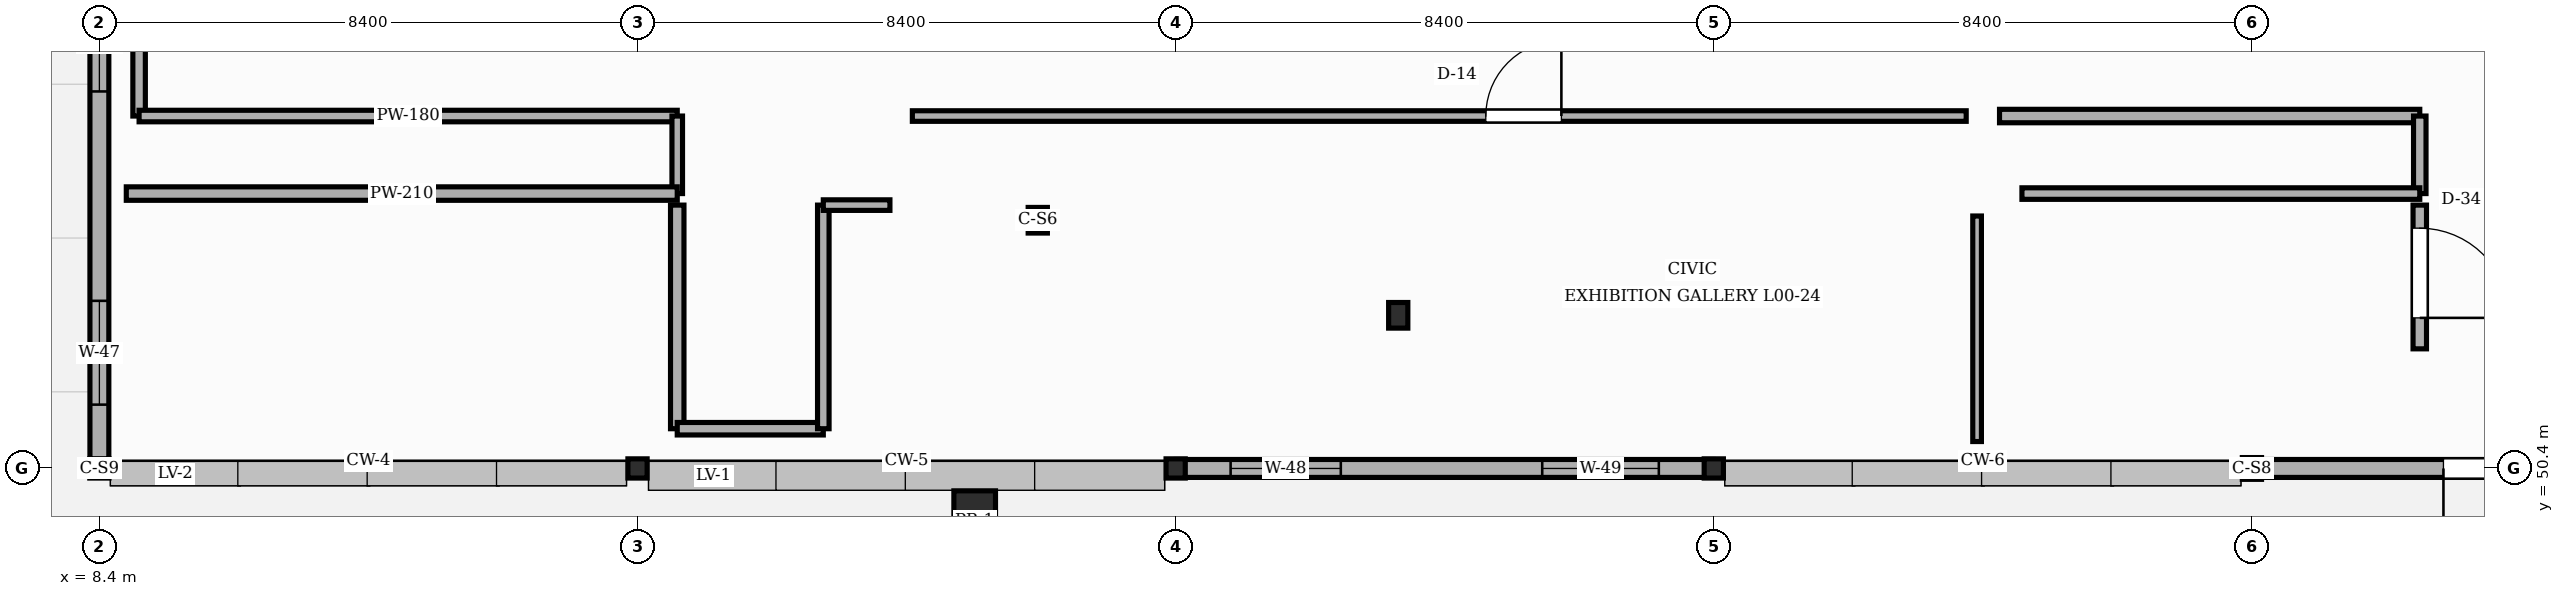
"""IFC4 building model, lengths in metres.
Left out: names, types, materials, properties, quantities, classifications, styles, units other than length and angle.
Written with IfcOpenShell. Run it as: python <this file> out.ifc"""

import sys

from ifc_helpers import new_model, si_unit, direction, frame, frame_2d, origin, origin_2d, place, context, subcontext, project, spatial, rectangle, i_section, extrude, element, fill, save


model = new_model("IFC4")
c1 = context("Model", 3, precision=1e-05, world=origin(), true_north=direction((0.0, 1.0)))
c2 = subcontext(c1, "Body", "Model", "MODEL_VIEW")
j1 = project(units=[si_unit("LENGTHUNIT", "METRE"), si_unit("PLANEANGLEUNIT", "RADIAN")], contexts=[c1])
p1 = place(None, origin())
s1 = spatial("IfcSite", under=j1, at=p1, CompositionType="ELEMENT")
p2 = place(p1, origin())
s2 = spatial("IfcBuilding", under=s1, at=p2, CompositionType="ELEMENT")
p3 = place(p2, origin())
s3 = spatial("IfcBuildingStorey", under=s2, at=p3, CompositionType="ELEMENT", Elevation=0.0)
for number, where, z_axis, x_axis in (
    (1, (8.4, 50.4, 0.0), (0.0, 0.0, 1.0), (1.0, 0.0, 0.0)),
    (2, (16.8, 50.4, 0.0), (0.0, 0.0, 1.0), (1.0, 0.0, 0.0)),
    (3, (25.2, 50.4, 0.0), (0.0, 0.0, 1.0), (1.0, 0.0, 0.0)),
    (4, (33.6, 50.4, 0.0), (0.0, 0.0, 1.0), (1.0, 0.0, 0.0)),
):
    element("IfcColumn", number, at=place(p3, frame(where, z_axis=z_axis, x_axis=x_axis)), inside=s3, PredefinedType="COLUMN", context=c2, shape_type="SweptSolid", body=[
        extrude(i_section(OverallWidth=0.3, OverallDepth=0.3, WebThickness=0.011, FlangeThickness=0.019, FilletRadius=0.027, at=origin_2d()), origin(), (0.0, 0.0, 1.0), 5.4),
    ])
p4 = place(p3, frame((42.0, 50.4, 0.0), z_axis=(0.0, 0.0, 1.0), x_axis=(1.0, 0.0, 0.0)))
e5 = element("IfcColumn", 5, at=p4, inside=s3, PredefinedType="COLUMN", context=c2, shape_type="SweptSolid", body=[
    extrude(i_section(OverallWidth=0.3, OverallDepth=0.34, WebThickness=0.012, FlangeThickness=0.021, FilletRadius=0.027, at=origin_2d()), origin(), (0.0, 0.0, 1.0), 5.4),
])
p5 = place(p3, frame((22.063, 49.576, 0.0), z_axis=(0.0, 0.0, 1.0), x_axis=(1.0, 0.0, 0.0)))
e6 = element("IfcColumn", 6, at=p5, inside=s3, PredefinedType="PILASTER", context=c2, shape_type="SweptSolid", body=[
    extrude(rectangle(XDim=0.65, YDim=0.95, at=origin_2d()), origin(), (0.0, 0.0, 1.0), 5.4),
])
for number, where, z_axis, x_axis in (
    (7, (23.048, 54.274, 0.0), (0.0, 0.0, 1.0), (1.0, 0.0, 0.0)),
    (8, (28.674, 52.79, 0.0), (0.0, 0.0, 1.0), (1.0, 0.0, 0.0)),
):
    element("IfcColumn", number, at=place(p3, frame(where, z_axis=z_axis, x_axis=x_axis)), inside=s3, PredefinedType="COLUMN", context=c2, shape_type="SweptSolid", body=[
        extrude(i_section(OverallWidth=0.3, OverallDepth=0.4, WebThickness=0.013, FlangeThickness=0.024, FilletRadius=0.027, at=origin_2d()), origin(), (0.0, 0.0, 1.0), 5.4),
    ])
p6 = place(p3, frame((8.4, 58.654, 0.0), z_axis=(0.0, 0.0, 1.0), x_axis=(0.0, -1.0, 0.0)))
e9 = element("IfcWall", 9, at=p6, inside=s3, PredefinedType="STANDARD", context=c2, shape_type="SweptSolid", body=[
    extrude(rectangle(XDim=8.108, YDim=0.295, at=frame_2d((4.054, 0.0))), origin(), (0.0, 0.0, 1.0), 4.887),
])
p7 = place(p6, frame((0.85, 0.0, 0.9)))
e10 = element("IfcOpeningElement", 10, at=p7, cuts=e9, PredefinedType="OPENING", context=c2, shape_type="SweptSolid", body=[
    extrude(rectangle(XDim=1.52, YDim=1.85, at=frame_2d((0.76, 0.925))), frame((0.0, 0.157, 0.0), z_axis=(0.0, -1.0, 0.0), x_axis=(1.0, 0.0, 0.0)), (0.0, 0.0, 1.0), 0.315),
])
p8 = place(p6, frame((5.638, 0.0, 0.9)))
e11 = element("IfcOpeningElement", 11, at=p8, cuts=e9, PredefinedType="OPENING", context=c2, shape_type="SweptSolid", body=[
    extrude(rectangle(XDim=1.62, YDim=1.85, at=frame_2d((0.81, 0.925))), frame((0.0, 0.157, 0.0), z_axis=(0.0, -1.0, 0.0), x_axis=(1.0, 0.0, 0.0)), (0.0, 0.0, 1.0), 0.315),
])
p9 = place(p3, frame((25.208, 50.4, 0.0), z_axis=(0.0, 0.0, 1.0), x_axis=(1.0, 0.0, 0.0)))
e12 = element("IfcWall", 12, at=p9, inside=s3, PredefinedType="STANDARD", context=c2, shape_type="SweptSolid", body=[
    extrude(rectangle(XDim=8.384, YDim=0.28, at=frame_2d((4.192, 0.0))), origin(), (0.0, 0.0, 1.0), 4.752),
])
p10 = place(p9, frame((0.85, 0.0, 0.9)))
e13 = element("IfcOpeningElement", 13, at=p10, cuts=e12, PredefinedType="OPENING", context=c2, shape_type="SweptSolid", body=[
    extrude(rectangle(XDim=1.72, YDim=1.85, at=frame_2d((0.86, 0.925))), frame((0.0, 0.15, 0.0), z_axis=(0.0, -1.0, 0.0), x_axis=(1.0, 0.0, 0.0)), (0.0, 0.0, 1.0), 0.3),
])
p11 = place(p9, frame((5.714, 0.0, 0.9)))
e14 = element("IfcOpeningElement", 14, at=p11, cuts=e12, PredefinedType="OPENING", context=c2, shape_type="SweptSolid", body=[
    extrude(rectangle(XDim=1.82, YDim=1.85, at=frame_2d((0.91, 0.925))), frame((0.0, 0.15, 0.0), z_axis=(0.0, -1.0, 0.0), x_axis=(1.0, 0.0, 0.0)), (0.0, 0.0, 1.0), 0.3),
])
p12 = place(p3, frame((50.392, 50.4, 0.0), z_axis=(0.0, 0.0, 1.0), x_axis=(-1.0, 0.0, 0.0)))
e15 = element("IfcWall", 15, at=p12, inside=s3, PredefinedType="STANDARD", context=c2, shape_type="SweptSolid", body=[
    extrude(rectangle(XDim=8.384, YDim=0.28, at=frame_2d((4.192, 0.0))), origin(), (0.0, 0.0, 1.0), 4.827),
])
p13 = place(p12, frame((2.452, 0.0, 0.0)))
e16 = element("IfcOpeningElement", 16, at=p13, cuts=e15, PredefinedType="OPENING", context=c2, shape_type="SweptSolid", body=[
    extrude(rectangle(XDim=2.95, YDim=2.4, at=frame_2d((1.475, 1.2))), frame((0.0, 0.15, 0.0), z_axis=(0.0, -1.0, 0.0), x_axis=(1.0, 0.0, 0.0)), (0.0, 0.0, 1.0), 0.3),
])
p14 = place(p3, frame((9.02, 58.18, -0.004), z_axis=(0.0, 0.0, 1.0), x_axis=(0.0, -1.0, 0.0)))
e17 = element("IfcWall", 17, at=p14, inside=s3, PredefinedType="STANDARD", context=c2, shape_type="SweptSolid", body=[
    extrude(rectangle(XDim=2.28, YDim=0.195, at=frame_2d((1.14, 0.0))), origin(), (0.0, 0.0, 1.0), 5.179),
])
p15 = place(p3, frame((9.02, 55.9, -0.004), z_axis=(0.0, 0.0, 1.0), x_axis=(1.0, 0.0, 0.0)))
e18 = element("IfcWall", 18, at=p15, inside=s3, PredefinedType="STANDARD", context=c2, shape_type="SweptSolid", body=[
    extrude(rectangle(XDim=8.4, YDim=0.18, at=frame_2d((4.2, 0.0))), origin(), (0.0, 0.0, 1.0), 5.179),
])
p16 = place(p3, frame((17.42, 55.9, -0.004), z_axis=(0.0, 0.0, 1.0), x_axis=(0.0, -1.0, 0.0)))
e19 = element("IfcWall", 19, at=p16, inside=s3, PredefinedType="STANDARD", context=c2, shape_type="SweptSolid", body=[
    extrude(rectangle(XDim=1.21, YDim=0.165, at=frame_2d((0.605, 0.0))), origin(), (0.0, 0.0, 1.0), 5.179),
])
p17 = place(p3, frame((17.42, 54.69, -0.004), z_axis=(0.0, 0.0, 1.0), x_axis=(-1.0, 0.0, 0.0)))
e20 = element("IfcWall", 20, at=p17, inside=s3, PredefinedType="STANDARD", context=c2, shape_type="SweptSolid", body=[
    extrude(rectangle(XDim=8.6, YDim=0.21, at=frame_2d((4.3, 0.0))), origin(), (0.0, 0.0, 1.0), 5.179),
])
p18 = place(p3, frame((21.09, 55.9, -0.004), z_axis=(0.0, 0.0, 1.0), x_axis=(1.0, 0.0, 0.0)))
e21 = element("IfcWall", 21, at=p18, inside=s3, PredefinedType="STANDARD", context=c2, shape_type="SweptSolid", body=[
    extrude(rectangle(XDim=16.45, YDim=0.165, at=frame_2d((8.225, 0.0))), origin(), (0.0, 0.0, 1.0), 5.179),
])
p19 = place(p18, frame((8.951, 0.0, 0.0)))
e22 = element("IfcOpeningElement", 22, at=p19, cuts=e21, PredefinedType="OPENING", context=c2, shape_type="SweptSolid", body=[
    extrude(rectangle(XDim=1.18, YDim=2.14, at=frame_2d((0.59, 1.07))), frame((0.0, 0.093, 0.0), z_axis=(0.0, -1.0, 0.0), x_axis=(1.0, 0.0, 0.0)), (0.0, 0.0, 1.0), 0.185),
])
p20 = place(p3, frame((38.06, 55.9, -0.004), z_axis=(0.0, 0.0, 1.0), x_axis=(1.0, 0.0, 0.0)))
e23 = element("IfcWall", 23, at=p20, inside=s3, PredefinedType="STANDARD", context=c2, shape_type="SweptSolid", body=[
    extrude(rectangle(XDim=6.56, YDim=0.21, at=frame_2d((3.28, 0.0))), origin(), (0.0, 0.0, 1.0), 5.179),
])
p21 = place(p3, frame((44.62, 55.9, -0.004), z_axis=(0.0, 0.0, 1.0), x_axis=(0.0, -1.0, 0.0)))
e24 = element("IfcWall", 24, at=p21, inside=s3, PredefinedType="STANDARD", context=c2, shape_type="SweptSolid", body=[
    extrude(rectangle(XDim=1.21, YDim=0.195, at=frame_2d((0.605, 0.0))), origin(), (0.0, 0.0, 1.0), 4.891),
])
p22 = place(p3, frame((44.62, 54.69, -0.004), z_axis=(0.0, 0.0, 1.0), x_axis=(-1.0, 0.0, 0.0)))
e25 = element("IfcWall", 25, at=p22, inside=s3, PredefinedType="STANDARD", context=c2, shape_type="SweptSolid", body=[
    extrude(rectangle(XDim=6.21, YDim=0.18, at=frame_2d((3.105, 0.0))), origin(), (0.0, 0.0, 1.0), 5.179),
])
p23 = place(p3, frame((37.71, 54.34, -0.004), z_axis=(0.0, 0.0, 1.0), x_axis=(0.0, -1.0, 0.0)))
e26 = element("IfcWall", 26, at=p23, inside=s3, PredefinedType="STANDARD", context=c2, shape_type="SweptSolid", body=[
    extrude(rectangle(XDim=3.52, YDim=0.135, at=frame_2d((1.76, 0.0))), origin(), (0.0, 0.0, 1.0), 5.179),
])
p24 = place(p3, frame((17.42, 54.51, -0.004), z_axis=(0.0, 0.0, 1.0), x_axis=(0.0, -1.0, 0.0)))
e27 = element("IfcWall", 27, at=p24, inside=s3, PredefinedType="STANDARD", context=c2, shape_type="SweptSolid", body=[
    extrude(rectangle(XDim=3.49, YDim=0.21, at=frame_2d((1.745, 0.0))), origin(), (0.0, 0.0, 1.0), 5.179),
])
p25 = place(p3, frame((17.42, 51.02, -0.004), z_axis=(0.0, 0.0, 1.0), x_axis=(1.0, 0.0, 0.0)))
e28 = element("IfcWall", 28, at=p25, inside=s3, PredefinedType="STANDARD", context=c2, shape_type="SweptSolid", body=[
    extrude(rectangle(XDim=2.28, YDim=0.195, at=frame_2d((1.14, 0.0))), origin(), (0.0, 0.0, 1.0), 5.179),
])
p26 = place(p3, frame((19.7, 51.02, -0.004), z_axis=(0.0, 0.0, 1.0), x_axis=(0.0, 1.0, 0.0)))
e29 = element("IfcWall", 29, at=p26, inside=s3, PredefinedType="STANDARD", context=c2, shape_type="SweptSolid", body=[
    extrude(rectangle(XDim=3.49, YDim=0.18, at=frame_2d((1.745, 0.0))), origin(), (0.0, 0.0, 1.0), 4.891),
])
p27 = place(p3, frame((19.7, 54.51, -0.004), z_axis=(0.0, 0.0, 1.0), x_axis=(1.0, 0.0, 0.0)))
e30 = element("IfcWall", 30, at=p27, inside=s3, PredefinedType="STANDARD", context=c2, shape_type="SweptSolid", body=[
    extrude(rectangle(XDim=1.04, YDim=0.165, at=frame_2d((0.52, 0.0))), origin(), (0.0, 0.0, 1.0), 5.179),
])
p28 = place(p3, frame((44.62, 54.51, -0.004), z_axis=(0.0, 0.0, 1.0), x_axis=(0.0, -1.0, 0.0)))
e31 = element("IfcWall", 31, at=p28, inside=s3, PredefinedType="STANDARD", context=c2, shape_type="SweptSolid", body=[
    extrude(rectangle(XDim=2.243, YDim=0.21, at=frame_2d((1.122, 0.0))), origin(), (0.0, 0.0, 1.0), 4.891),
])
p29 = place(p28, frame((0.36, 0.0, 0.0)))
e32 = element("IfcOpeningElement", 32, at=p29, cuts=e31, PredefinedType="OPENING", context=c2, shape_type="SweptSolid", body=[
    extrude(rectangle(XDim=1.4, YDim=2.3, at=frame_2d((0.7, 1.15))), frame((0.0, 0.115, 0.0), z_axis=(0.0, -1.0, 0.0), x_axis=(1.0, 0.0, 0.0)), (0.0, 0.0, 1.0), 0.23),
])
p30 = place(p7, origin())
e33 = element("IfcWindow", 33, at=p30, inside=s3, PartitioningType="SINGLE_PANEL", PredefinedType="WINDOW", context=c2, shape_type="SweptSolid", body=[
    extrude(rectangle(XDim=1.52, YDim=1.85, at=frame_2d((0.76, 0.925))), frame((0.0, 0.03, 0.0), z_axis=(0.0, -1.0, 0.0), x_axis=(1.0, 0.0, 0.0)), (0.0, 0.0, 1.0), 0.06),
])
fill(e10, e33)
p31 = place(p8, origin())
e34 = element("IfcWindow", 34, at=p31, inside=s3, PartitioningType="SINGLE_PANEL", PredefinedType="WINDOW", context=c2, shape_type="SweptSolid", body=[
    extrude(rectangle(XDim=1.62, YDim=1.85, at=frame_2d((0.81, 0.925))), frame((0.0, 0.03, 0.0), z_axis=(0.0, -1.0, 0.0), x_axis=(1.0, 0.0, 0.0)), (0.0, 0.0, 1.0), 0.06),
])
fill(e11, e34)
p32 = place(p10, origin())
e35 = element("IfcWindow", 35, at=p32, inside=s3, PartitioningType="SINGLE_PANEL", PredefinedType="WINDOW", context=c2, shape_type="SweptSolid", body=[
    extrude(rectangle(XDim=1.72, YDim=1.85, at=frame_2d((0.86, 0.925))), frame((0.0, 0.03, 0.0), z_axis=(0.0, -1.0, 0.0), x_axis=(1.0, 0.0, 0.0)), (0.0, 0.0, 1.0), 0.06),
])
fill(e13, e35)
p33 = place(p11, origin())
e36 = element("IfcWindow", 36, at=p33, inside=s3, PartitioningType="SINGLE_PANEL", PredefinedType="WINDOW", context=c2, shape_type="SweptSolid", body=[
    extrude(rectangle(XDim=1.82, YDim=1.85, at=frame_2d((0.91, 0.925))), frame((0.0, 0.03, 0.0), z_axis=(0.0, -1.0, 0.0), x_axis=(1.0, 0.0, 0.0)), (0.0, 0.0, 1.0), 0.06),
])
fill(e14, e36)
p34 = place(p13, origin())
e37 = element("IfcDoor", 37, at=p34, inside=s3, OperationType="DOUBLE_DOOR_SINGLE_SWING", PredefinedType="DOOR", context=c2, shape_type="SweptSolid", body=[
    extrude(rectangle(XDim=2.95, YDim=2.4, at=frame_2d((1.475, 1.2))), frame((0.0, 0.025, 0.0), z_axis=(0.0, -1.0, 0.0), x_axis=(1.0, 0.0, 0.0)), (0.0, 0.0, 1.0), 0.05),
])
fill(e16, e37)
p35 = place(p19, origin())
e38 = element("IfcDoor", 38, at=p35, inside=s3, OperationType="SINGLE_SWING_RIGHT", PredefinedType="DOOR", context=c2, shape_type="SweptSolid", body=[
    extrude(rectangle(XDim=1.18, YDim=2.14, at=frame_2d((0.59, 1.07))), frame((0.0, 0.025, 0.0), z_axis=(0.0, -1.0, 0.0), x_axis=(1.0, 0.0, 0.0)), (0.0, 0.0, 1.0), 0.05),
])
fill(e22, e38)
p36 = place(p29, origin())
e39 = element("IfcDoor", 39, at=p36, inside=s3, OperationType="SINGLE_SWING_RIGHT", PredefinedType="DOOR", context=c2, shape_type="SweptSolid", body=[
    extrude(rectangle(XDim=1.4, YDim=2.3, at=frame_2d((0.7, 1.15))), frame((0.0, 0.025, 0.0), z_axis=(0.0, -1.0, 0.0), x_axis=(1.0, 0.0, 0.0)), (0.0, 0.0, 1.0), 0.05),
])
fill(e32, e39)
save(model, sys.argv[1])
